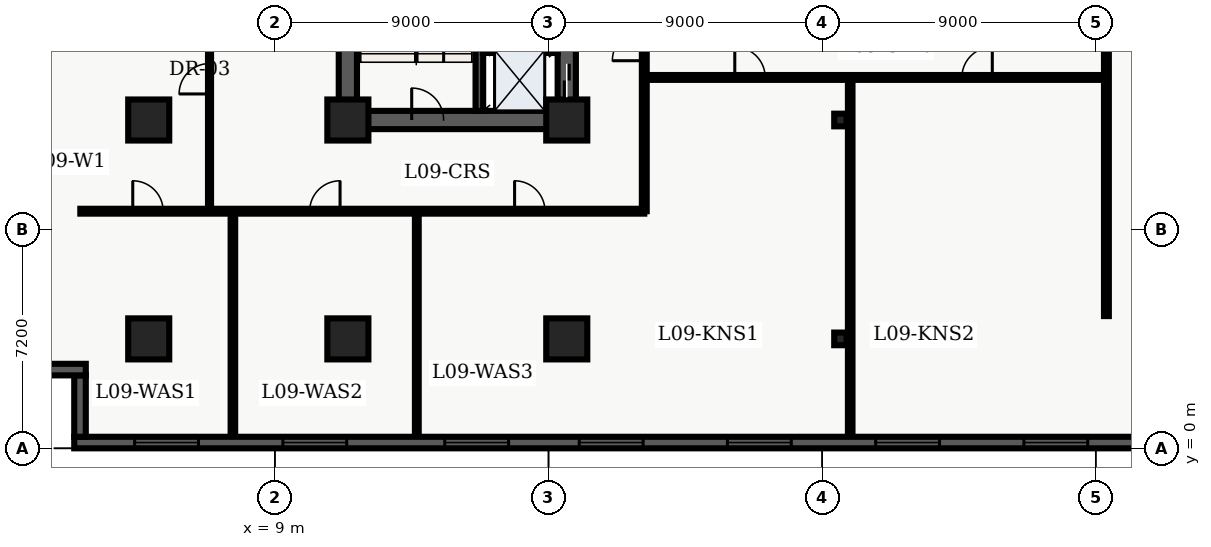
"""IFC4 building model, lengths in metres.
Left out: names, types, materials, properties, quantities, classifications, styles, units other than length and angle.
Written with IfcOpenShell. Run it as: python <this file> out.ifc"""

import sys

from ifc_helpers import new_model, entity, si_unit, converted_unit, direction, frame, origin_with_axes, origin_2d_with_axis, place, context, subcontext, project, spatial, polyline, rectangle, i_section, outline, extrude, element, fill, save


model = new_model("IFC4")
c1 = context("Model", 3, precision=1e-05, world=origin_with_axes(), true_north=direction((0.0, 1.0)))
c2 = subcontext(c1, "Body", "Model", "MODEL_VIEW")
j1 = project(units=[si_unit("LENGTHUNIT", "METRE"), converted_unit("PLANEANGLEUNIT", "DEGREE", entity("IfcPlaneAngleMeasure", 0.017), si_unit("PLANEANGLEUNIT", "RADIAN"), dimensions=[0, 0, 0, 0, 0, 0, 0])], contexts=[c1])
p1 = place(None, origin_with_axes())
s1 = spatial("IfcSite", under=j1, at=p1, CompositionType="ELEMENT")
p2 = place(p1, origin_with_axes())
s2 = spatial("IfcBuilding", under=s1, at=p2, CompositionType="ELEMENT")
p3 = place(p2, frame((0.0, 0.0, 40.5), z_axis=(0.0, 0.0, 1.0), x_axis=(1.0, 0.0, 0.0)))
s3 = spatial("IfcBuildingStorey", under=s2, at=p3, CompositionType="ELEMENT", Elevation=40.5)
p4 = place(p3, frame((11.4, 10.8, 0.0), z_axis=(0.0, 0.0, 1.0), x_axis=(0.0, 1.0, 0.0)))
e1 = element("IfcWall", 1, at=p4, inside=s3, PredefinedType="SHEAR", context=c2, shape_type="SweptSolid", body=[
    extrude(outline(polyline([(0.0, -0.3), (27.0, -0.3), (27.0, 0.3), (0.0, 0.3), (0.0, -0.3)])), origin_with_axes(), (0.0, 0.0, 1.0), 3.66),
])
p5 = place(p3, frame((11.4, 10.8, 0.0), z_axis=(0.0, 0.0, 1.0), x_axis=(1.0, 0.0, 0.0)))
e2 = element("IfcWall", 2, at=p5, inside=s3, PredefinedType="SHEAR", context=c2, shape_type="SweptSolid", body=[
    extrude(outline(polyline([(0.0, -0.3), (7.2, -0.3), (7.2, 0.3), (0.0, 0.3), (0.0, -0.3)])), origin_with_axes(), (0.0, 0.0, 1.0), 3.66),
])
p6 = place(p5, frame((2.625, 0.0, 0.0), z_axis=(0.0, 0.0, 1.0), x_axis=(1.0, 0.0, 0.0)))
e3 = element("IfcOpeningElement", 3, at=p6, cuts=e2, PredefinedType="OPENING", context=c2, shape_type="SweptSolid", body=[
    extrude(rectangle(XDim=1.05, YDim=0.62, at=origin_2d_with_axis()), origin_with_axes(), (0.0, 0.0, 1.0), 2.15),
])
p7 = place(p3, frame((18.6, 10.8, 0.0), z_axis=(0.0, 0.0, 1.0), x_axis=(0.0, 1.0, 0.0)))
e4 = element("IfcWall", 4, at=p7, inside=s3, PredefinedType="SHEAR", context=c2, shape_type="SweptSolid", body=[
    extrude(outline(polyline([(0.0, -0.3), (13.5, -0.3), (13.5, 0.3), (0.0, 0.3), (0.0, -0.3)])), origin_with_axes(), (0.0, 0.0, 1.0), 3.66),
])
p8 = place(p7, frame((1.3, 0.0, 0.0), z_axis=(0.0, 0.0, 1.0), x_axis=(1.0, 0.0, 0.0)))
e5 = element("IfcOpeningElement", 5, at=p8, cuts=e4, PredefinedType="OPENING", context=c2, shape_type="SweptSolid", body=[
    extrude(rectangle(XDim=1.1, YDim=0.62, at=origin_2d_with_axis()), origin_with_axes(), (0.0, 0.0, 1.0), 2.15),
])
p9 = place(p7, frame((3.4, 0.0, 0.0), z_axis=(0.0, 0.0, 1.0), x_axis=(1.0, 0.0, 0.0)))
e6 = element("IfcOpeningElement", 6, at=p9, cuts=e4, PredefinedType="OPENING", context=c2, shape_type="SweptSolid", body=[
    extrude(rectangle(XDim=1.1, YDim=0.62, at=origin_2d_with_axis()), origin_with_axes(), (0.0, 0.0, 1.0), 2.15),
])
p10 = place(p7, frame((11.125, 0.0, 0.0), z_axis=(0.0, 0.0, 1.0), x_axis=(1.0, 0.0, 0.0)))
e7 = element("IfcOpeningElement", 7, at=p10, cuts=e4, PredefinedType="OPENING", context=c2, shape_type="SweptSolid", body=[
    extrude(rectangle(XDim=1.05, YDim=0.62, at=origin_2d_with_axis()), origin_with_axes(), (0.0, 0.0, 1.0), 2.15),
])
p11 = place(p3, frame((15.725, 11.1, 0.0), z_axis=(0.0, 0.0, 1.0), x_axis=(0.0, 1.0, 0.0)))
e8 = element("IfcWall", 8, at=p11, inside=s3, PredefinedType="SHEAR", context=c2, shape_type="SweptSolid", body=[
    extrude(outline(polyline([(0.0, -0.125), (8.6, -0.125), (8.6, 0.125), (0.0, 0.125), (0.0, -0.125)])), origin_with_axes(), (0.0, 0.0, 1.0), 3.66),
])
for number, where, z_axis, x_axis in (
    (9, (11.4, 3.6, 0.0), (0.0, 0.0, 1.0), (1.0, 0.0, 0.0)),
    (10, (11.4, 10.8, 0.0), (0.0, 0.0, 1.0), (1.0, 0.0, 0.0)),
    (11, (18.6, 3.6, 0.0), (0.0, 0.0, 1.0), (1.0, 0.0, 0.0)),
    (12, (18.6, 10.8, 0.0), (0.0, 0.0, 1.0), (1.0, 0.0, 0.0)),
    (13, (4.85, 3.6, 0.0), (0.0, 0.0, 1.0), (1.0, 0.0, 0.0)),
    (14, (4.85, 10.8, 0.0), (0.0, 0.0, 1.0), (1.0, 0.0, 0.0)),
):
    element("IfcColumn", number, at=place(p3, frame(where, z_axis=z_axis, x_axis=x_axis)), inside=s3, PredefinedType="COLUMN", context=c2, shape_type="SweptSolid", body=[
        extrude(rectangle(XDim=1.35, YDim=1.35, at=origin_2d_with_axis()), origin_with_axes(), (0.0, 0.0, 1.0), 3.9),
    ])
for number, where, z_axis, x_axis in (
    (15, (27.6, 3.6, 0.0), (0.0, 0.0, 1.0), (1.0, 0.0, 0.0)),
    (16, (27.6, 10.8, 0.0), (0.0, 0.0, 1.0), (1.0, 0.0, 0.0)),
):
    element("IfcColumn", number, at=place(p3, frame(where, z_axis=z_axis, x_axis=x_axis)), inside=s3, PredefinedType="COLUMN", context=c2, shape_type="SweptSolid", body=[
        extrude(i_section(OverallWidth=0.406, OverallDepth=0.416, WebThickness=0.03, FlangeThickness=0.048, FilletRadius=0.022, at=origin_2d_with_axis()), origin_with_axes(), (0.0, 0.0, 1.0), 3.9),
    ])
p12 = place(p3, frame((15.84, 13.13, 0.0), z_axis=(0.0, 0.0, 1.0), x_axis=(1.0, 0.0, 0.0)))
e17 = element("IfcWall", 17, at=p12, inside=s3, PredefinedType="SOLIDWALL", context=c2, shape_type="SweptSolid", body=[
    extrude(outline(polyline([(0.0, -0.125), (2.46, -0.125), (2.46, 0.125), (0.0, 0.125), (0.0, -0.125)])), origin_with_axes(), (0.0, 0.0, 1.0), 2.7),
])
p13 = place(p3, frame((2.6, 7.8, 0.0), z_axis=(0.0, 0.0, 1.0), x_axis=(1.0, 0.0, 0.0)))
e18 = element("IfcWall", 18, at=p13, inside=s3, PredefinedType="PARTITIONING", context=c2, shape_type="SweptSolid", body=[
    extrude(outline(polyline([(0.0, -0.08), (18.55, -0.08), (18.55, 0.08), (0.0, 0.08), (0.0, -0.08)])), origin_with_axes(), (0.0, 0.0, 1.0), 2.7),
])
p14 = place(p13, frame((2.225, 0.0, 0.0), z_axis=(0.0, 0.0, 1.0), x_axis=(1.0, 0.0, 0.0)))
e19 = element("IfcOpeningElement", 19, at=p14, cuts=e18, PredefinedType="OPENING", context=c2, shape_type="SweptSolid", body=[
    extrude(rectangle(XDim=1.0, YDim=0.18, at=origin_2d_with_axis()), origin_with_axes(), (0.0, 0.0, 1.0), 2.15),
])
p15 = place(p13, frame((8.043, 0.0, 0.0), z_axis=(0.0, 0.0, 1.0), x_axis=(1.0, 0.0, 0.0)))
e20 = element("IfcOpeningElement", 20, at=p15, cuts=e18, PredefinedType="OPENING", context=c2, shape_type="SweptSolid", body=[
    extrude(rectangle(XDim=1.0, YDim=0.18, at=origin_2d_with_axis()), origin_with_axes(), (0.0, 0.0, 1.0), 2.15),
])
p16 = place(p13, frame((14.784, 0.0, 0.0), z_axis=(0.0, 0.0, 1.0), x_axis=(1.0, 0.0, 0.0)))
e21 = element("IfcOpeningElement", 21, at=p16, cuts=e18, PredefinedType="OPENING", context=c2, shape_type="SweptSolid", body=[
    extrude(rectangle(XDim=1.0, YDim=0.18, at=origin_2d_with_axis()), origin_with_axes(), (0.0, 0.0, 1.0), 2.15),
])
p17 = place(p3, frame((21.15, 7.8, 0.0), z_axis=(0.0, 0.0, 1.0), x_axis=(0.0, 1.0, 0.0)))
e22 = element("IfcWall", 22, at=p17, inside=s3, PredefinedType="PARTITIONING", context=c2, shape_type="SweptSolid", body=[
    extrude(outline(polyline([(0.0, -0.08), (32.7, -0.08), (32.7, 0.08), (0.0, 0.08), (0.0, -0.08)])), origin_with_axes(), (0.0, 0.0, 1.0), 2.7),
])
p18 = place(p17, frame((5.475, 0.0, 0.0), z_axis=(0.0, 0.0, 1.0), x_axis=(1.0, 0.0, 0.0)))
e23 = element("IfcOpeningElement", 23, at=p18, cuts=e22, PredefinedType="OPENING", context=c2, shape_type="SweptSolid", body=[
    extrude(rectangle(XDim=1.05, YDim=0.18, at=origin_2d_with_axis()), origin_with_axes(), (0.0, 0.0, 1.0), 2.15),
])
p19 = place(p3, frame((6.85, 7.8, 0.0), z_axis=(0.0, 0.0, 1.0), x_axis=(0.0, 1.0, 0.0)))
e24 = element("IfcWall", 24, at=p19, inside=s3, PredefinedType="PARTITIONING", context=c2, shape_type="SweptSolid", body=[
    extrude(outline(polyline([(0.0, -0.05), (32.7, -0.05), (32.7, 0.05), (0.0, 0.05), (0.0, -0.05)])), origin_with_axes(), (0.0, 0.0, 1.0), 2.7),
])
p20 = place(p19, frame((4.357, 0.0, 0.0), z_axis=(0.0, 0.0, 1.0), x_axis=(1.0, 0.0, 0.0)))
e25 = element("IfcOpeningElement", 25, at=p20, cuts=e24, PredefinedType="OPENING", context=c2, shape_type="SweptSolid", body=[
    extrude(rectangle(XDim=1.0, YDim=0.12, at=origin_2d_with_axis()), origin_with_axes(), (0.0, 0.0, 1.0), 2.15),
])
p21 = place(p19, frame((11.996, 0.0, 0.0), z_axis=(0.0, 0.0, 1.0), x_axis=(1.0, 0.0, 0.0)))
e26 = element("IfcOpeningElement", 26, at=p21, cuts=e24, PredefinedType="OPENING", context=c2, shape_type="SweptSolid", body=[
    extrude(rectangle(XDim=1.0, YDim=0.12, at=origin_2d_with_axis()), origin_with_axes(), (0.0, 0.0, 1.0), 2.15),
])
p22 = place(p19, frame((22.0, 0.0, 0.0), z_axis=(0.0, 0.0, 1.0), x_axis=(1.0, 0.0, 0.0)))
e27 = element("IfcOpeningElement", 27, at=p22, cuts=e24, PredefinedType="OPENING", context=c2, shape_type="SweptSolid", body=[
    extrude(rectangle(XDim=1.0, YDim=0.12, at=origin_2d_with_axis()), origin_with_axes(), (0.0, 0.0, 1.0), 2.15),
])
p23 = place(p19, frame((31.67, 0.0, 0.0), z_axis=(0.0, 0.0, 1.0), x_axis=(1.0, 0.0, 0.0)))
e28 = element("IfcOpeningElement", 28, at=p23, cuts=e24, PredefinedType="OPENING", context=c2, shape_type="SweptSolid", body=[
    extrude(rectangle(XDim=1.0, YDim=0.12, at=origin_2d_with_axis()), origin_with_axes(), (0.0, 0.0, 1.0), 2.15),
])
p24 = place(p3, frame((7.619, 0.36, 0.0), z_axis=(0.0, 0.0, 1.0), x_axis=(0.0, 1.0, 0.0)))
e29 = element("IfcWall", 29, at=p24, inside=s3, PredefinedType="PARTITIONING", context=c2, shape_type="SweptSolid", body=[
    extrude(outline(polyline([(0.0, -0.075), (7.34, -0.075), (7.34, 0.075), (0.0, 0.075), (0.0, -0.075)])), origin_with_axes(), (0.0, 0.0, 1.0), 2.7),
])
p25 = place(p3, frame((13.668, 0.36, 0.0), z_axis=(0.0, 0.0, 1.0), x_axis=(0.0, 1.0, 0.0)))
e30 = element("IfcWall", 30, at=p25, inside=s3, PredefinedType="PARTITIONING", context=c2, shape_type="SweptSolid", body=[
    extrude(outline(polyline([(0.0, -0.062), (7.34, -0.062), (7.34, 0.062), (0.0, 0.062), (0.0, -0.062)])), origin_with_axes(), (0.0, 0.0, 1.0), 2.7),
])
p26 = place(p3, frame((21.15, 12.2, 0.0), z_axis=(0.0, 0.0, 1.0), x_axis=(1.0, 0.0, 0.0)))
e31 = element("IfcWall", 31, at=p26, inside=s3, PredefinedType="PARTITIONING", context=c2, shape_type="SweptSolid", body=[
    extrude(outline(polyline([(0.0, -0.08), (15.2, -0.08), (15.2, 0.08), (0.0, 0.08), (0.0, -0.08)])), origin_with_axes(), (0.0, 0.0, 1.0), 2.7),
])
p27 = place(p26, frame((3.477, 0.0, 0.0), z_axis=(0.0, 0.0, 1.0), x_axis=(1.0, 0.0, 0.0)))
e32 = element("IfcOpeningElement", 32, at=p27, cuts=e31, PredefinedType="OPENING", context=c2, shape_type="SweptSolid", body=[
    extrude(rectangle(XDim=1.0, YDim=0.18, at=origin_2d_with_axis()), origin_with_axes(), (0.0, 0.0, 1.0), 2.15),
])
p28 = place(p26, frame((10.947, 0.0, 0.0), z_axis=(0.0, 0.0, 1.0), x_axis=(1.0, 0.0, 0.0)))
e33 = element("IfcOpeningElement", 33, at=p28, cuts=e31, PredefinedType="OPENING", context=c2, shape_type="SweptSolid", body=[
    extrude(rectangle(XDim=1.0, YDim=0.18, at=origin_2d_with_axis()), origin_with_axes(), (0.0, 0.0, 1.0), 2.15),
])
p29 = place(p3, frame((36.35, 4.35, 0.0), z_axis=(0.0, 0.0, 1.0), x_axis=(0.0, 1.0, 0.0)))
e34 = element("IfcWall", 34, at=p29, inside=s3, PredefinedType="PARTITIONING", context=c2, shape_type="SweptSolid", body=[
    extrude(outline(polyline([(0.0, -0.08), (16.95, -0.08), (16.95, 0.08), (0.0, 0.08), (0.0, -0.08)])), origin_with_axes(), (0.0, 0.0, 1.0), 2.7),
])
p30 = place(p3, frame((27.923, 0.36, 0.0), z_axis=(0.0, 0.0, 1.0), x_axis=(0.0, 1.0, 0.0)))
e35 = element("IfcWall", 35, at=p30, inside=s3, PredefinedType="PARTITIONING", context=c2, shape_type="SweptSolid", body=[
    extrude(outline(polyline([(0.0, -0.075), (11.72, -0.075), (11.72, 0.075), (0.0, 0.075), (0.0, -0.075)])), origin_with_axes(), (0.0, 0.0, 1.0), 2.7),
])
p31 = place(p3, frame((57.22, 0.19, 0.0), z_axis=(0.0, 0.0, 1.0), x_axis=(-1.0, 0.0, 0.0)))
e36 = element("IfcWall", 36, at=p31, inside=s3, PredefinedType="SOLIDWALL", context=c2, shape_type="SweptSolid", body=[
    extrude(outline(polyline([(0.0, -0.19), (54.82, -0.19), (54.82, 0.19), (0.0, 0.19), (0.0, -0.19)])), origin_with_axes(), (0.0, 0.0, 1.0), 3.66),
])
p32 = place(p31, frame((3.037, 0.0, 0.45), z_axis=(0.0, 0.0, 1.0), x_axis=(1.0, 0.0, 0.0)))
e37 = element("IfcOpeningElement", 37, at=p32, cuts=e36, PredefinedType="OPENING", context=c2, shape_type="SweptSolid", body=[
    extrude(rectangle(XDim=2.1, YDim=0.4, at=origin_2d_with_axis()), origin_with_axes(), (0.0, 0.0, 1.0), 2.2),
])
p33 = place(p31, frame((7.912, 0.0, 0.45), z_axis=(0.0, 0.0, 1.0), x_axis=(1.0, 0.0, 0.0)))
e38 = element("IfcOpeningElement", 38, at=p33, cuts=e36, PredefinedType="OPENING", context=c2, shape_type="SweptSolid", body=[
    extrude(rectangle(XDim=2.1, YDim=0.4, at=origin_2d_with_axis()), origin_with_axes(), (0.0, 0.0, 1.0), 2.2),
])
p34 = place(p31, frame((12.786, 0.0, 0.45), z_axis=(0.0, 0.0, 1.0), x_axis=(1.0, 0.0, 0.0)))
e39 = element("IfcOpeningElement", 39, at=p34, cuts=e36, PredefinedType="OPENING", context=c2, shape_type="SweptSolid", body=[
    extrude(rectangle(XDim=2.1, YDim=0.4, at=origin_2d_with_axis()), origin_with_axes(), (0.0, 0.0, 1.0), 2.2),
])
p35 = place(p31, frame((17.661, 0.0, 0.45), z_axis=(0.0, 0.0, 1.0), x_axis=(1.0, 0.0, 0.0)))
e40 = element("IfcOpeningElement", 40, at=p35, cuts=e36, PredefinedType="OPENING", context=c2, shape_type="SweptSolid", body=[
    extrude(rectangle(XDim=2.1, YDim=0.4, at=origin_2d_with_axis()), origin_with_axes(), (0.0, 0.0, 1.0), 2.2),
])
p36 = place(p31, frame((22.535, 0.0, 0.45), z_axis=(0.0, 0.0, 1.0), x_axis=(1.0, 0.0, 0.0)))
e41 = element("IfcOpeningElement", 41, at=p36, cuts=e36, PredefinedType="OPENING", context=c2, shape_type="SweptSolid", body=[
    extrude(rectangle(XDim=2.1, YDim=0.4, at=origin_2d_with_axis()), origin_with_axes(), (0.0, 0.0, 1.0), 2.2),
])
p37 = place(p31, frame((27.41, 0.0, 0.45), z_axis=(0.0, 0.0, 1.0), x_axis=(1.0, 0.0, 0.0)))
e42 = element("IfcOpeningElement", 42, at=p37, cuts=e36, PredefinedType="OPENING", context=c2, shape_type="SweptSolid", body=[
    extrude(rectangle(XDim=2.1, YDim=0.4, at=origin_2d_with_axis()), origin_with_axes(), (0.0, 0.0, 1.0), 2.2),
])
p38 = place(p31, frame((32.285, 0.0, 0.45), z_axis=(0.0, 0.0, 1.0), x_axis=(1.0, 0.0, 0.0)))
e43 = element("IfcOpeningElement", 43, at=p38, cuts=e36, PredefinedType="OPENING", context=c2, shape_type="SweptSolid", body=[
    extrude(rectangle(XDim=2.1, YDim=0.4, at=origin_2d_with_axis()), origin_with_axes(), (0.0, 0.0, 1.0), 2.2),
])
p39 = place(p31, frame((37.159, 0.0, 0.45), z_axis=(0.0, 0.0, 1.0), x_axis=(1.0, 0.0, 0.0)))
e44 = element("IfcOpeningElement", 44, at=p39, cuts=e36, PredefinedType="OPENING", context=c2, shape_type="SweptSolid", body=[
    extrude(rectangle(XDim=2.1, YDim=0.4, at=origin_2d_with_axis()), origin_with_axes(), (0.0, 0.0, 1.0), 2.2),
])
p40 = place(p31, frame((41.584, 0.0, 0.45), z_axis=(0.0, 0.0, 1.0), x_axis=(1.0, 0.0, 0.0)))
e45 = element("IfcOpeningElement", 45, at=p40, cuts=e36, PredefinedType="OPENING", context=c2, shape_type="SweptSolid", body=[
    extrude(rectangle(XDim=2.1, YDim=0.4, at=origin_2d_with_axis()), origin_with_axes(), (0.0, 0.0, 1.0), 2.2),
])
p41 = place(p31, frame((46.908, 0.0, 0.45), z_axis=(0.0, 0.0, 1.0), x_axis=(1.0, 0.0, 0.0)))
e46 = element("IfcOpeningElement", 46, at=p41, cuts=e36, PredefinedType="OPENING", context=c2, shape_type="SweptSolid", body=[
    extrude(rectangle(XDim=2.1, YDim=0.4, at=origin_2d_with_axis()), origin_with_axes(), (0.0, 0.0, 1.0), 2.2),
])
p42 = place(p31, frame((51.783, 0.0, 0.45), z_axis=(0.0, 0.0, 1.0), x_axis=(1.0, 0.0, 0.0)))
e47 = element("IfcOpeningElement", 47, at=p42, cuts=e36, PredefinedType="OPENING", context=c2, shape_type="SweptSolid", body=[
    extrude(rectangle(XDim=2.1, YDim=0.4, at=origin_2d_with_axis()), origin_with_axes(), (0.0, 0.0, 1.0), 2.2),
])
p43 = place(p3, frame((2.59, 0.38, 0.0), z_axis=(0.0, 0.0, 1.0), x_axis=(0.0, 1.0, 0.0)))
e48 = element("IfcWall", 48, at=p43, inside=s3, PredefinedType="SOLIDWALL", context=c2, shape_type="SweptSolid", body=[
    extrude(outline(polyline([(0.0, -0.19), (2.02, -0.19), (2.02, 0.19), (0.0, 0.19), (0.0, -0.19)])), origin_with_axes(), (0.0, 0.0, 1.0), 3.66),
])
p44 = place(p3, frame((2.78, 2.59, 0.0), z_axis=(0.0, 0.0, 1.0), x_axis=(-1.0, 0.0, 0.0)))
e49 = element("IfcWall", 49, at=p44, inside=s3, PredefinedType="SOLIDWALL", context=c2, shape_type="SweptSolid", body=[
    extrude(outline(polyline([(0.0, -0.19), (2.78, -0.19), (2.78, 0.19), (0.0, 0.19), (0.0, -0.19)])), origin_with_axes(), (0.0, 0.0, 1.0), 3.66),
])
p45 = place(p7, frame((1.3, 0.0, 0.0), z_axis=(0.0, 0.0, 1.0), x_axis=(1.0, 0.0, 0.0)))
e50 = element("IfcDoor", 50, at=p45, inside=s3, OperationType="SLIDING_TO_LEFT", PredefinedType="DOOR", context=c2, shape_type="SweptSolid", body=[
    extrude(rectangle(XDim=1.1, YDim=0.09, at=origin_2d_with_axis()), origin_with_axes(), (0.0, 0.0, 1.0), 2.15),
])
fill(e5, e50)
p46 = place(p5, frame((2.625, 0.0, 0.0), z_axis=(0.0, 0.0, 1.0), x_axis=(1.0, 0.0, 0.0)))
e51 = element("IfcDoor", 51, at=p46, inside=s3, OperationType="SINGLE_SWING_LEFT", PredefinedType="DOOR", context=c2, shape_type="SweptSolid", body=[
    extrude(rectangle(XDim=1.05, YDim=0.09, at=origin_2d_with_axis()), origin_with_axes(), (0.0, 0.0, 1.0), 2.15),
])
fill(e3, e51)
p47 = place(p19, frame((4.357, 0.0, 0.0), z_axis=(0.0, 0.0, 1.0), x_axis=(1.0, 0.0, 0.0)))
e52 = element("IfcDoor", 52, at=p47, inside=s3, OperationType="SINGLE_SWING_LEFT", PredefinedType="DOOR", context=c2, shape_type="SweptSolid", body=[
    extrude(rectangle(XDim=1.0, YDim=0.06, at=origin_2d_with_axis()), origin_with_axes(), (0.0, 0.0, 1.0), 2.15),
])
fill(e25, e52)
p48 = place(p13, frame((2.225, 0.0, 0.0), z_axis=(0.0, 0.0, 1.0), x_axis=(1.0, 0.0, 0.0)))
e53 = element("IfcDoor", 53, at=p48, inside=s3, OperationType="SINGLE_SWING_LEFT", PredefinedType="DOOR", context=c2, shape_type="SweptSolid", body=[
    extrude(rectangle(XDim=1.0, YDim=0.09, at=origin_2d_with_axis()), origin_with_axes(), (0.0, 0.0, 1.0), 2.15),
])
fill(e19, e53)
p49 = place(p13, frame((8.043, 0.0, 0.0), z_axis=(0.0, 0.0, 1.0), x_axis=(1.0, 0.0, 0.0)))
e54 = element("IfcDoor", 54, at=p49, inside=s3, OperationType="SINGLE_SWING_RIGHT", PredefinedType="DOOR", context=c2, shape_type="SweptSolid", body=[
    extrude(rectangle(XDim=1.0, YDim=0.09, at=origin_2d_with_axis()), origin_with_axes(), (0.0, 0.0, 1.0), 2.15),
])
fill(e20, e54)
p50 = place(p13, frame((14.784, 0.0, 0.0), z_axis=(0.0, 0.0, 1.0), x_axis=(1.0, 0.0, 0.0)))
e55 = element("IfcDoor", 55, at=p50, inside=s3, OperationType="SINGLE_SWING_LEFT", PredefinedType="DOOR", context=c2, shape_type="SweptSolid", body=[
    extrude(rectangle(XDim=1.0, YDim=0.09, at=origin_2d_with_axis()), origin_with_axes(), (0.0, 0.0, 1.0), 2.15),
])
fill(e21, e55)
p51 = place(p17, frame((5.475, 0.0, 0.0), z_axis=(0.0, 0.0, 1.0), x_axis=(1.0, 0.0, 0.0)))
e56 = element("IfcDoor", 56, at=p51, inside=s3, OperationType="SINGLE_SWING_LEFT", PredefinedType="DOOR", context=c2, shape_type="SweptSolid", body=[
    extrude(rectangle(XDim=1.05, YDim=0.09, at=origin_2d_with_axis()), origin_with_axes(), (0.0, 0.0, 1.0), 2.15),
])
fill(e23, e56)
p52 = place(p26, frame((3.477, 0.0, 0.0), z_axis=(0.0, 0.0, 1.0), x_axis=(1.0, 0.0, 0.0)))
e57 = element("IfcDoor", 57, at=p52, inside=s3, OperationType="SINGLE_SWING_LEFT", PredefinedType="DOOR", context=c2, shape_type="SweptSolid", body=[
    extrude(rectangle(XDim=1.0, YDim=0.09, at=origin_2d_with_axis()), origin_with_axes(), (0.0, 0.0, 1.0), 2.15),
])
fill(e32, e57)
p53 = place(p26, frame((10.947, 0.0, 0.0), z_axis=(0.0, 0.0, 1.0), x_axis=(1.0, 0.0, 0.0)))
e58 = element("IfcDoor", 58, at=p53, inside=s3, OperationType="SINGLE_SWING_RIGHT", PredefinedType="DOOR", context=c2, shape_type="SweptSolid", body=[
    extrude(rectangle(XDim=1.0, YDim=0.09, at=origin_2d_with_axis()), origin_with_axes(), (0.0, 0.0, 1.0), 2.15),
])
fill(e33, e58)
p54 = place(p31, frame((22.535, 0.0, 0.45), z_axis=(0.0, 0.0, 1.0), x_axis=(1.0, 0.0, 0.0)))
e59 = element("IfcWindow", 59, at=p54, inside=s3, PredefinedType="WINDOW", context=c2, shape_type="SweptSolid", body=[
    extrude(rectangle(XDim=2.1, YDim=0.09, at=origin_2d_with_axis()), origin_with_axes(), (0.0, 0.0, 1.0), 2.2),
])
fill(e41, e59)
p55 = place(p31, frame((27.41, 0.0, 0.45), z_axis=(0.0, 0.0, 1.0), x_axis=(1.0, 0.0, 0.0)))
e60 = element("IfcWindow", 60, at=p55, inside=s3, PredefinedType="WINDOW", context=c2, shape_type="SweptSolid", body=[
    extrude(rectangle(XDim=2.1, YDim=0.09, at=origin_2d_with_axis()), origin_with_axes(), (0.0, 0.0, 1.0), 2.2),
])
fill(e42, e60)
p56 = place(p31, frame((32.285, 0.0, 0.45), z_axis=(0.0, 0.0, 1.0), x_axis=(1.0, 0.0, 0.0)))
e61 = element("IfcWindow", 61, at=p56, inside=s3, PredefinedType="WINDOW", context=c2, shape_type="SweptSolid", body=[
    extrude(rectangle(XDim=2.1, YDim=0.09, at=origin_2d_with_axis()), origin_with_axes(), (0.0, 0.0, 1.0), 2.2),
])
fill(e43, e61)
p57 = place(p31, frame((37.159, 0.0, 0.45), z_axis=(0.0, 0.0, 1.0), x_axis=(1.0, 0.0, 0.0)))
e62 = element("IfcWindow", 62, at=p57, inside=s3, PredefinedType="WINDOW", context=c2, shape_type="SweptSolid", body=[
    extrude(rectangle(XDim=2.1, YDim=0.09, at=origin_2d_with_axis()), origin_with_axes(), (0.0, 0.0, 1.0), 2.2),
])
fill(e44, e62)
p58 = place(p31, frame((41.584, 0.0, 0.45), z_axis=(0.0, 0.0, 1.0), x_axis=(1.0, 0.0, 0.0)))
e63 = element("IfcWindow", 63, at=p58, inside=s3, PredefinedType="WINDOW", context=c2, shape_type="SweptSolid", body=[
    extrude(rectangle(XDim=2.1, YDim=0.09, at=origin_2d_with_axis()), origin_with_axes(), (0.0, 0.0, 1.0), 2.2),
])
fill(e45, e63)
p59 = place(p31, frame((46.908, 0.0, 0.45), z_axis=(0.0, 0.0, 1.0), x_axis=(1.0, 0.0, 0.0)))
e64 = element("IfcWindow", 64, at=p59, inside=s3, PredefinedType="WINDOW", context=c2, shape_type="SweptSolid", body=[
    extrude(rectangle(XDim=2.1, YDim=0.09, at=origin_2d_with_axis()), origin_with_axes(), (0.0, 0.0, 1.0), 2.2),
])
fill(e46, e64)
p60 = place(p31, frame((51.783, 0.0, 0.45), z_axis=(0.0, 0.0, 1.0), x_axis=(1.0, 0.0, 0.0)))
e65 = element("IfcWindow", 65, at=p60, inside=s3, PredefinedType="WINDOW", context=c2, shape_type="SweptSolid", body=[
    extrude(rectangle(XDim=2.1, YDim=0.09, at=origin_2d_with_axis()), origin_with_axes(), (0.0, 0.0, 1.0), 2.2),
])
fill(e47, e65)
save(model, sys.argv[1])
